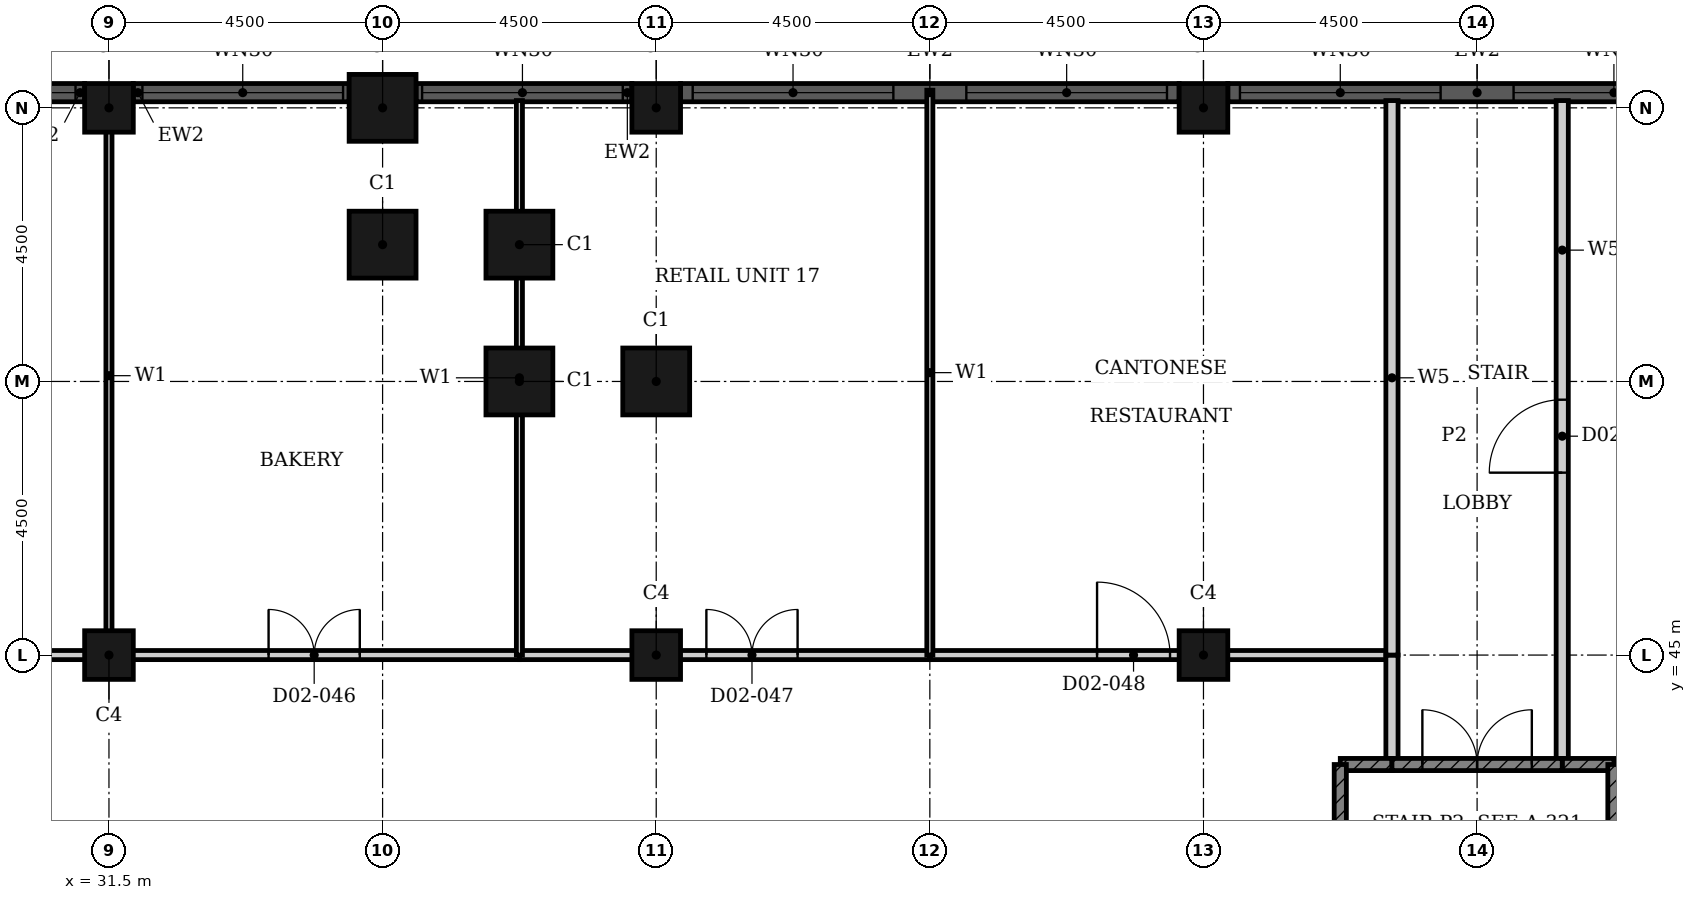
"""IFC4 building model, lengths in metres.
Left out: names, types, materials, properties, quantities, classifications, styles, units other than length and angle.
Written with IfcOpenShell. Run it as: python <this file> out.ifc"""

import sys

from ifc_helpers import new_model, si_unit, direction, frame, frame_2d, origin, origin_2d, place, context, subcontext, project, spatial, rectangle, hollow_rectangle, extrude, element, fill, save


model = new_model("IFC4")
c1 = context("Model", 3, precision=1e-05, world=origin(), true_north=direction((0.0, 1.0)))
c2 = subcontext(c1, "Body", "Model", "MODEL_VIEW")
j1 = project(units=[si_unit("LENGTHUNIT", "METRE"), si_unit("PLANEANGLEUNIT", "RADIAN")], contexts=[c1])
p1 = place(None, origin())
s1 = spatial("IfcSite", under=j1, at=p1, CompositionType="ELEMENT")
p2 = place(p1, origin())
s2 = spatial("IfcBuilding", under=s1, at=p2, CompositionType="ELEMENT")
p3 = place(p2, frame((0.0, 0.0, 12.0)))
s3 = spatial("IfcBuildingStorey", under=s2, at=p3, CompositionType="ELEMENT", Elevation=12.0)
for number, where, z_axis, x_axis in (
    (1, (40.5, 49.5, 0.0), (0.0, 0.0, 1.0), (1.0, 0.0, 0.0)),
    (2, (38.25, 49.5, 0.0), (0.0, 0.0, 1.0), (1.0, 0.0, 0.0)),
    (3, (38.25, 51.75, 0.0), (0.0, 0.0, 1.0), (1.0, 0.0, 0.0)),
    (4, (36.0, 51.75, 0.0), (0.0, 0.0, 1.0), (1.0, 0.0, 0.0)),
    (5, (36.0, 54.0, 0.0), (0.0, 0.0, 1.0), (1.0, 0.0, 0.0)),
):
    element("IfcColumn", number, at=place(p3, frame(where, z_axis=z_axis, x_axis=x_axis)), inside=s3, PredefinedType="COLUMN", context=c2, shape_type="SweptSolid", body=[
        extrude(hollow_rectangle(XDim=1.1, YDim=1.1, WallThickness=0.036, at=origin_2d()), origin(), (0.0, 0.0, 1.0), 5.4),
    ])
for number, where, z_axis, x_axis in (
    (6, (31.5, 54.0, 0.0), (0.0, 0.0, 1.0), (1.0, 0.0, 0.0)),
    (7, (40.5, 54.0, 0.0), (0.0, 0.0, 1.0), (1.0, 0.0, 0.0)),
    (8, (49.5, 54.0, 0.0), (0.0, 0.0, 1.0), (1.0, 0.0, 0.0)),
    (9, (31.5, 45.0, 0.0), (0.0, 0.0, 1.0), (1.0, 0.0, 0.0)),
    (10, (40.5, 45.0, 0.0), (0.0, 0.0, 1.0), (1.0, 0.0, 0.0)),
    (11, (49.5, 45.0, 0.0), (0.0, 0.0, 1.0), (1.0, 0.0, 0.0)),
):
    element("IfcColumn", number, at=place(p3, frame(where, z_axis=z_axis, x_axis=x_axis)), inside=s3, PredefinedType="COLUMN", context=c2, shape_type="SweptSolid", body=[
        extrude(hollow_rectangle(XDim=0.8, YDim=0.8, WallThickness=0.025, at=origin_2d()), origin(), (0.0, 0.0, 1.0), 5.4),
    ])
p4 = place(p3, frame((58.1, 54.25, 0.0), z_axis=(0.0, 0.0, 1.0), x_axis=(-1.0, 0.0, 0.0)))
e12 = element("IfcWall", 12, at=p4, inside=s3, PredefinedType="SOLIDWALL", context=c2, shape_type="SweptSolid", body=[
    extrude(rectangle(XDim=8.2, YDim=0.3, at=frame_2d((4.1, 0.0))), origin(), (0.0, 0.0, 1.0), 5.4),
])
p5 = place(p4, frame((0.2, 0.0, 0.9)))
e13 = element("IfcOpeningElement", 13, at=p5, cuts=e12, PredefinedType="OPENING", context=c2, shape_type="SweptSolid", body=[
    extrude(rectangle(XDim=3.3, YDim=3.5, at=frame_2d((1.65, 1.75))), frame((0.0, 0.16, 0.0), z_axis=(0.0, -1.0, 0.0), x_axis=(1.0, 0.0, 0.0)), (0.0, 0.0, 1.0), 0.32),
])
p6 = place(p4, frame((4.7, 0.0, 0.9)))
e14 = element("IfcOpeningElement", 14, at=p6, cuts=e12, PredefinedType="OPENING", context=c2, shape_type="SweptSolid", body=[
    extrude(rectangle(XDim=3.3, YDim=3.5, at=frame_2d((1.65, 1.75))), frame((0.0, 0.16, 0.0), z_axis=(0.0, -1.0, 0.0), x_axis=(1.0, 0.0, 0.0)), (0.0, 0.0, 1.0), 0.32),
])
p7 = place(p3, frame((49.1, 54.25, 0.0), z_axis=(0.0, 0.0, 1.0), x_axis=(-1.0, 0.0, 0.0)))
e15 = element("IfcWall", 15, at=p7, inside=s3, PredefinedType="SOLIDWALL", context=c2, shape_type="SweptSolid", body=[
    extrude(rectangle(XDim=8.2, YDim=0.3, at=frame_2d((4.1, 0.0))), origin(), (0.0, 0.0, 1.0), 5.4),
])
p8 = place(p7, frame((0.2, 0.0, 0.9)))
e16 = element("IfcOpeningElement", 16, at=p8, cuts=e15, PredefinedType="OPENING", context=c2, shape_type="SweptSolid", body=[
    extrude(rectangle(XDim=3.3, YDim=3.5, at=frame_2d((1.65, 1.75))), frame((0.0, 0.16, 0.0), z_axis=(0.0, -1.0, 0.0), x_axis=(1.0, 0.0, 0.0)), (0.0, 0.0, 1.0), 0.32),
])
p9 = place(p7, frame((4.7, 0.0, 0.9)))
e17 = element("IfcOpeningElement", 17, at=p9, cuts=e15, PredefinedType="OPENING", context=c2, shape_type="SweptSolid", body=[
    extrude(rectangle(XDim=3.3, YDim=3.5, at=frame_2d((1.65, 1.75))), frame((0.0, 0.16, 0.0), z_axis=(0.0, -1.0, 0.0), x_axis=(1.0, 0.0, 0.0)), (0.0, 0.0, 1.0), 0.32),
])
p10 = place(p3, frame((40.1, 54.25, 0.0), z_axis=(0.0, 0.0, 1.0), x_axis=(-1.0, 0.0, 0.0)))
e18 = element("IfcWall", 18, at=p10, inside=s3, PredefinedType="SOLIDWALL", context=c2, shape_type="SweptSolid", body=[
    extrude(rectangle(XDim=3.55, YDim=0.3, at=frame_2d((1.775, 0.0))), origin(), (0.0, 0.0, 1.0), 5.4),
])
p11 = place(p10, frame((0.15, 0.0, 0.9)))
e19 = element("IfcOpeningElement", 19, at=p11, cuts=e18, PredefinedType="OPENING", context=c2, shape_type="SweptSolid", body=[
    extrude(rectangle(XDim=3.3, YDim=3.5, at=frame_2d((1.65, 1.75))), frame((0.0, 0.16, 0.0), z_axis=(0.0, -1.0, 0.0), x_axis=(1.0, 0.0, 0.0)), (0.0, 0.0, 1.0), 0.32),
])
p12 = place(p3, frame((35.45, 54.25, 0.0), z_axis=(0.0, 0.0, 1.0), x_axis=(-1.0, 0.0, 0.0)))
e20 = element("IfcWall", 20, at=p12, inside=s3, PredefinedType="SOLIDWALL", context=c2, shape_type="SweptSolid", body=[
    extrude(rectangle(XDim=3.55, YDim=0.3, at=frame_2d((1.775, 0.0))), origin(), (0.0, 0.0, 1.0), 5.4),
])
p13 = place(p12, frame((0.1, 0.0, 0.9)))
e21 = element("IfcOpeningElement", 21, at=p13, cuts=e20, PredefinedType="OPENING", context=c2, shape_type="SweptSolid", body=[
    extrude(rectangle(XDim=3.3, YDim=3.5, at=frame_2d((1.65, 1.75))), frame((0.0, 0.16, 0.0), z_axis=(0.0, -1.0, 0.0), x_axis=(1.0, 0.0, 0.0)), (0.0, 0.0, 1.0), 0.32),
])
p14 = place(p3, frame((31.1, 54.25, 0.0), z_axis=(0.0, 0.0, 1.0), x_axis=(-1.0, 0.0, 0.0)))
e22 = element("IfcWall", 22, at=p14, inside=s3, PredefinedType="SOLIDWALL", context=c2, shape_type="SweptSolid", body=[
    extrude(rectangle(XDim=3.55, YDim=0.3, at=frame_2d((1.775, 0.0))), origin(), (0.0, 0.0, 1.0), 5.4),
])
p15 = place(p14, frame((0.15, 0.0, 0.9)))
e23 = element("IfcOpeningElement", 23, at=p15, cuts=e22, PredefinedType="OPENING", context=c2, shape_type="SweptSolid", body=[
    extrude(rectangle(XDim=3.3, YDim=3.5, at=frame_2d((1.65, 1.75))), frame((0.0, 0.16, 0.0), z_axis=(0.0, -1.0, 0.0), x_axis=(1.0, 0.0, 0.0)), (0.0, 0.0, 1.0), 0.32),
])
p16 = place(p3, frame((18.0, 45.0, 0.0), z_axis=(0.0, 0.0, 1.0), x_axis=(1.0, 0.0, 0.0)))
e24 = element("IfcWall", 24, at=p16, inside=s3, PredefinedType="PARTITIONING", context=c2, shape_type="SweptSolid", body=[
    extrude(rectangle(XDim=13.5, YDim=0.15, at=frame_2d((6.75, 0.0))), origin(), (0.0, 0.0, 1.0), 5.05),
])
p17 = place(p16, frame((6.15, 0.0, 0.0)))
e25 = element("IfcOpeningElement", 25, at=p17, cuts=e24, PredefinedType="OPENING", context=c2, shape_type="SweptSolid", body=[
    extrude(rectangle(XDim=1.2, YDim=2.4, at=frame_2d((0.6, 1.2))), frame((0.0, 0.085, 0.0), z_axis=(0.0, -1.0, 0.0), x_axis=(1.0, 0.0, 0.0)), (0.0, 0.0, 1.0), 0.17),
])
p18 = place(p3, frame((31.5, 45.0, 0.0), z_axis=(0.0, 0.0, 1.0), x_axis=(1.0, 0.0, 0.0)))
e26 = element("IfcWall", 26, at=p18, inside=s3, PredefinedType="PARTITIONING", context=c2, shape_type="SweptSolid", body=[
    extrude(rectangle(XDim=6.75, YDim=0.15, at=frame_2d((3.375, 0.0))), origin(), (0.0, 0.0, 1.0), 5.05),
])
p19 = place(p18, frame((2.625, 0.0, 0.0)))
e27 = element("IfcOpeningElement", 27, at=p19, cuts=e26, PredefinedType="OPENING", context=c2, shape_type="SweptSolid", body=[
    extrude(rectangle(XDim=1.5, YDim=2.4, at=frame_2d((0.75, 1.2))), frame((0.0, 0.085, 0.0), z_axis=(0.0, -1.0, 0.0), x_axis=(1.0, 0.0, 0.0)), (0.0, 0.0, 1.0), 0.17),
])
p20 = place(p3, frame((38.25, 45.0, 0.0), z_axis=(0.0, 0.0, 1.0), x_axis=(1.0, 0.0, 0.0)))
e28 = element("IfcWall", 28, at=p20, inside=s3, PredefinedType="PARTITIONING", context=c2, shape_type="SweptSolid", body=[
    extrude(rectangle(XDim=6.75, YDim=0.15, at=frame_2d((3.375, 0.0))), origin(), (0.0, 0.0, 1.0), 5.05),
])
p21 = place(p20, frame((3.075, 0.0, 0.0)))
e29 = element("IfcOpeningElement", 29, at=p21, cuts=e28, PredefinedType="OPENING", context=c2, shape_type="SweptSolid", body=[
    extrude(rectangle(XDim=1.5, YDim=2.4, at=frame_2d((0.75, 1.2))), frame((0.0, 0.085, 0.0), z_axis=(0.0, -1.0, 0.0), x_axis=(1.0, 0.0, 0.0)), (0.0, 0.0, 1.0), 0.17),
])
p22 = place(p3, frame((45.0, 45.0, 0.0), z_axis=(0.0, 0.0, 1.0), x_axis=(1.0, 0.0, 0.0)))
e30 = element("IfcWall", 30, at=p22, inside=s3, PredefinedType="PARTITIONING", context=c2, shape_type="SweptSolid", body=[
    extrude(rectangle(XDim=7.6, YDim=0.15, at=frame_2d((3.8, 0.0))), origin(), (0.0, 0.0, 1.0), 5.05),
])
p23 = place(p22, frame((2.75, 0.0, 0.0)))
e31 = element("IfcOpeningElement", 31, at=p23, cuts=e30, PredefinedType="OPENING", context=c2, shape_type="SweptSolid", body=[
    extrude(rectangle(XDim=1.2, YDim=2.4, at=frame_2d((0.6, 1.2))), frame((0.0, 0.085, 0.0), z_axis=(0.0, -1.0, 0.0), x_axis=(1.0, 0.0, 0.0)), (0.0, 0.0, 1.0), 0.17),
])
p24 = place(p3, frame((31.5, 45.0, 0.0), z_axis=(0.0, 0.0, 1.0), x_axis=(0.0, 1.0, 0.0)))
e32 = element("IfcWall", 32, at=p24, inside=s3, PredefinedType="PARTITIONING", context=c2, shape_type="SweptSolid", body=[
    extrude(rectangle(XDim=9.19, YDim=0.1, at=frame_2d((4.595, 0.0))), origin(), (0.0, 0.0, 1.0), 5.05),
])
p25 = place(p3, frame((38.25, 45.0, 0.0), z_axis=(0.0, 0.0, 1.0), x_axis=(0.0, 1.0, 0.0)))
e33 = element("IfcWall", 33, at=p25, inside=s3, PredefinedType="PARTITIONING", context=c2, shape_type="SweptSolid", body=[
    extrude(rectangle(XDim=9.12, YDim=0.1, at=frame_2d((4.56, 0.0))), origin(), (0.0, 0.0, 1.0), 5.05),
])
p26 = place(p3, frame((45.0, 45.0, 0.0), z_axis=(0.0, 0.0, 1.0), x_axis=(0.0, 1.0, 0.0)))
e34 = element("IfcWall", 34, at=p26, inside=s3, PredefinedType="PARTITIONING", context=c2, shape_type="SweptSolid", body=[
    extrude(rectangle(XDim=9.29, YDim=0.1, at=frame_2d((4.645, 0.0))), origin(), (0.0, 0.0, 1.0), 5.05),
])
p27 = place(p3, frame((52.6, 43.2, 0.0), z_axis=(0.0, 0.0, 1.0), x_axis=(0.0, 1.0, 0.0)))
e35 = element("IfcWall", 35, at=p27, inside=s3, PredefinedType="PARTITIONING", context=c2, shape_type="SweptSolid", body=[
    extrude(rectangle(XDim=1.8, YDim=0.2, at=frame_2d((0.9, 0.0))), origin(), (0.0, 0.0, 1.0), 5.05),
])
p28 = place(p3, frame((52.6, 45.0, 0.0), z_axis=(0.0, 0.0, 1.0), x_axis=(0.0, 1.0, 0.0)))
e36 = element("IfcWall", 36, at=p28, inside=s3, PredefinedType="PARTITIONING", context=c2, shape_type="SweptSolid", body=[
    extrude(rectangle(XDim=9.12, YDim=0.2, at=frame_2d((4.56, 0.0))), origin(), (0.0, 0.0, 1.0), 5.05),
])
p29 = place(p3, frame((55.4, 43.2, 0.0), z_axis=(0.0, 0.0, 1.0), x_axis=(0.0, 1.0, 0.0)))
e37 = element("IfcWall", 37, at=p29, inside=s3, PredefinedType="PARTITIONING", context=c2, shape_type="SweptSolid", body=[
    extrude(rectangle(XDim=10.92, YDim=0.2, at=frame_2d((5.46, 0.0))), origin(), (0.0, 0.0, 1.0), 5.05),
])
p30 = place(p29, frame((4.8, 0.0, 0.0)))
e38 = element("IfcOpeningElement", 38, at=p30, cuts=e37, PredefinedType="OPENING", context=c2, shape_type="SweptSolid", body=[
    extrude(rectangle(XDim=1.2, YDim=2.1, at=frame_2d((0.6, 1.05))), frame((0.0, 0.11, 0.0), z_axis=(0.0, -1.0, 0.0), x_axis=(1.0, 0.0, 0.0)), (0.0, 0.0, 1.0), 0.22),
])
for number, where, z_axis, x_axis in (
    (39, (51.75, 43.2, 0.0), (0.0, 0.0, 1.0), (1.0, 0.0, 0.0)),
    (40, (55.4, 43.2, 0.0), (0.0, 0.0, 1.0), (1.0, 0.0, 0.0)),
):
    element("IfcWall", number, at=place(p3, frame(where, z_axis=z_axis, x_axis=x_axis)), inside=s3, PredefinedType="SHEAR", context=c2, shape_type="SweptSolid", body=[
        extrude(rectangle(XDim=0.85, YDim=0.2, at=frame_2d((0.425, 0.0))), origin(), (0.0, 0.0, 1.0), 5.05),
    ])
p31 = place(p3, frame((52.6, 43.2, 0.0), z_axis=(0.0, 0.0, 1.0), x_axis=(1.0, 0.0, 0.0)))
e41 = element("IfcWall", 41, at=p31, inside=s3, PredefinedType="SHEAR", context=c2, shape_type="SweptSolid", body=[
    extrude(rectangle(XDim=2.8, YDim=0.2, at=frame_2d((1.4, 0.0))), origin(), (0.0, 0.0, 1.0), 5.05),
])
p32 = place(p31, frame((0.5, 0.0, 0.0)))
e42 = element("IfcOpeningElement", 42, at=p32, cuts=e41, PredefinedType="OPENING", context=c2, shape_type="SweptSolid", body=[
    extrude(rectangle(XDim=1.8, YDim=2.1, at=frame_2d((0.9, 1.05))), frame((0.0, 0.11, 0.0), z_axis=(0.0, -1.0, 0.0), x_axis=(1.0, 0.0, 0.0)), (0.0, 0.0, 1.0), 0.22),
])
for number, where, z_axis, x_axis in (
    (43, (51.75, 34.75, 0.0), (0.0, 0.0, 1.0), (0.0, 1.0, 0.0)),
    (44, (56.25, 34.75, 0.0), (0.0, 0.0, 1.0), (0.0, 1.0, 0.0)),
):
    element("IfcWall", number, at=place(p3, frame(where, z_axis=z_axis, x_axis=x_axis)), inside=s3, PredefinedType="SHEAR", context=c2, shape_type="SweptSolid", body=[
        extrude(rectangle(XDim=8.45, YDim=0.2, at=frame_2d((4.225, 0.0))), origin(), (0.0, 0.0, 1.0), 5.05),
    ])
p33 = place(p5, origin())
e45 = element("IfcWindow", 45, at=p33, inside=s3, PartitioningType="SINGLE_PANEL", PredefinedType="WINDOW", context=c2, shape_type="SweptSolid", body=[
    extrude(rectangle(XDim=3.3, YDim=3.5, at=frame_2d((1.65, 1.75))), frame((0.0, 0.03, 0.0), z_axis=(0.0, -1.0, 0.0), x_axis=(1.0, 0.0, 0.0)), (0.0, 0.0, 1.0), 0.06),
])
fill(e13, e45)
p34 = place(p6, origin())
e46 = element("IfcWindow", 46, at=p34, inside=s3, PartitioningType="SINGLE_PANEL", PredefinedType="WINDOW", context=c2, shape_type="SweptSolid", body=[
    extrude(rectangle(XDim=3.3, YDim=3.5, at=frame_2d((1.65, 1.75))), frame((0.0, 0.03, 0.0), z_axis=(0.0, -1.0, 0.0), x_axis=(1.0, 0.0, 0.0)), (0.0, 0.0, 1.0), 0.06),
])
fill(e14, e46)
p35 = place(p8, origin())
e47 = element("IfcWindow", 47, at=p35, inside=s3, PartitioningType="SINGLE_PANEL", PredefinedType="WINDOW", context=c2, shape_type="SweptSolid", body=[
    extrude(rectangle(XDim=3.3, YDim=3.5, at=frame_2d((1.65, 1.75))), frame((0.0, 0.03, 0.0), z_axis=(0.0, -1.0, 0.0), x_axis=(1.0, 0.0, 0.0)), (0.0, 0.0, 1.0), 0.06),
])
fill(e16, e47)
p36 = place(p9, origin())
e48 = element("IfcWindow", 48, at=p36, inside=s3, PartitioningType="SINGLE_PANEL", PredefinedType="WINDOW", context=c2, shape_type="SweptSolid", body=[
    extrude(rectangle(XDim=3.3, YDim=3.5, at=frame_2d((1.65, 1.75))), frame((0.0, 0.03, 0.0), z_axis=(0.0, -1.0, 0.0), x_axis=(1.0, 0.0, 0.0)), (0.0, 0.0, 1.0), 0.06),
])
fill(e17, e48)
p37 = place(p11, origin())
e49 = element("IfcWindow", 49, at=p37, inside=s3, PartitioningType="SINGLE_PANEL", PredefinedType="WINDOW", context=c2, shape_type="SweptSolid", body=[
    extrude(rectangle(XDim=3.3, YDim=3.5, at=frame_2d((1.65, 1.75))), frame((0.0, 0.03, 0.0), z_axis=(0.0, -1.0, 0.0), x_axis=(1.0, 0.0, 0.0)), (0.0, 0.0, 1.0), 0.06),
])
fill(e19, e49)
p38 = place(p13, origin())
e50 = element("IfcWindow", 50, at=p38, inside=s3, PartitioningType="SINGLE_PANEL", PredefinedType="WINDOW", context=c2, shape_type="SweptSolid", body=[
    extrude(rectangle(XDim=3.3, YDim=3.5, at=frame_2d((1.65, 1.75))), frame((0.0, 0.03, 0.0), z_axis=(0.0, -1.0, 0.0), x_axis=(1.0, 0.0, 0.0)), (0.0, 0.0, 1.0), 0.06),
])
fill(e21, e50)
p39 = place(p15, origin())
e51 = element("IfcWindow", 51, at=p39, inside=s3, PartitioningType="SINGLE_PANEL", PredefinedType="WINDOW", context=c2, shape_type="SweptSolid", body=[
    extrude(rectangle(XDim=3.3, YDim=3.5, at=frame_2d((1.65, 1.75))), frame((0.0, 0.03, 0.0), z_axis=(0.0, -1.0, 0.0), x_axis=(1.0, 0.0, 0.0)), (0.0, 0.0, 1.0), 0.06),
])
fill(e23, e51)
p40 = place(p30, origin())
e52 = element("IfcDoor", 52, at=p40, inside=s3, OperationType="SINGLE_SWING_RIGHT", PredefinedType="DOOR", context=c2, shape_type="SweptSolid", body=[
    extrude(rectangle(XDim=1.2, YDim=2.1, at=frame_2d((0.6, 1.05))), frame((0.0, 0.025, 0.0), z_axis=(0.0, -1.0, 0.0), x_axis=(1.0, 0.0, 0.0)), (0.0, 0.0, 1.0), 0.05),
])
fill(e38, e52)
p41 = place(p32, origin())
e53 = element("IfcDoor", 53, at=p41, inside=s3, OperationType="DOUBLE_DOOR_SINGLE_SWING", PredefinedType="DOOR", context=c2, shape_type="SweptSolid", body=[
    extrude(rectangle(XDim=1.8, YDim=2.1, at=frame_2d((0.9, 1.05))), frame((0.0, 0.025, 0.0), z_axis=(0.0, -1.0, 0.0), x_axis=(1.0, 0.0, 0.0)), (0.0, 0.0, 1.0), 0.05),
])
fill(e42, e53)
p42 = place(p19, origin())
e54 = element("IfcDoor", 54, at=p42, inside=s3, OperationType="DOUBLE_DOOR_SINGLE_SWING", PredefinedType="DOOR", context=c2, shape_type="SweptSolid", body=[
    extrude(rectangle(XDim=1.5, YDim=2.4, at=frame_2d((0.75, 1.2))), frame((0.0, 0.025, 0.0), z_axis=(0.0, -1.0, 0.0), x_axis=(1.0, 0.0, 0.0)), (0.0, 0.0, 1.0), 0.05),
])
fill(e27, e54)
p43 = place(p21, origin())
e55 = element("IfcDoor", 55, at=p43, inside=s3, OperationType="DOUBLE_DOOR_SINGLE_SWING", PredefinedType="DOOR", context=c2, shape_type="SweptSolid", body=[
    extrude(rectangle(XDim=1.5, YDim=2.4, at=frame_2d((0.75, 1.2))), frame((0.0, 0.025, 0.0), z_axis=(0.0, -1.0, 0.0), x_axis=(1.0, 0.0, 0.0)), (0.0, 0.0, 1.0), 0.05),
])
fill(e29, e55)
p44 = place(p23, origin())
e56 = element("IfcDoor", 56, at=p44, inside=s3, OperationType="SINGLE_SWING_LEFT", PredefinedType="DOOR", context=c2, shape_type="SweptSolid", body=[
    extrude(rectangle(XDim=1.2, YDim=2.4, at=frame_2d((0.6, 1.2))), frame((0.0, 0.025, 0.0), z_axis=(0.0, -1.0, 0.0), x_axis=(1.0, 0.0, 0.0)), (0.0, 0.0, 1.0), 0.05),
])
fill(e31, e56)
save(model, sys.argv[1])
